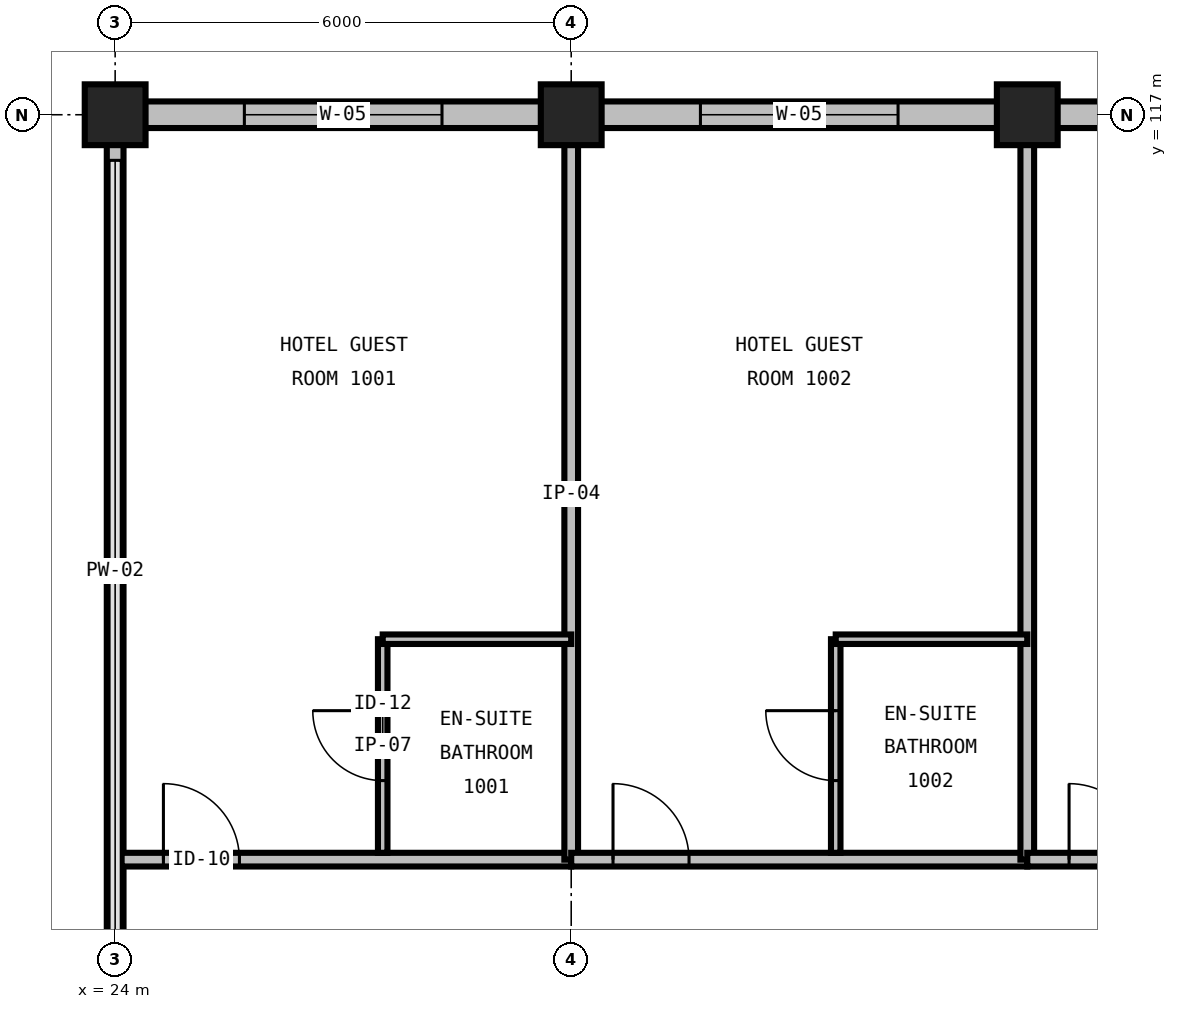
"""IFC4 building model, lengths in metres.
Left out: names, types, materials, properties, quantities, classifications, styles, units other than length and angle.
Written with IfcOpenShell. Run it as: python <this file> out.ifc"""

import sys

from ifc_helpers import new_model, si_unit, direction, frame, frame_2d, origin, origin_2d, place, context, subcontext, project, spatial, rectangle, extrude, element, fill, save


model = new_model("IFC4")
c1 = context("Model", 3, precision=1e-05, world=origin(), true_north=direction((0.0, 1.0)))
c2 = subcontext(c1, "Body", "Model", "MODEL_VIEW")
j1 = project(units=[si_unit("LENGTHUNIT", "METRE"), si_unit("PLANEANGLEUNIT", "RADIAN")], contexts=[c1])
p1 = place(None, origin())
s1 = spatial("IfcSite", under=j1, at=p1, CompositionType="ELEMENT")
p2 = place(p1, origin())
s2 = spatial("IfcBuilding", under=s1, at=p2, CompositionType="ELEMENT")
p3 = place(p2, frame((0.0, 0.0, 45.6)))
s3 = spatial("IfcBuildingStorey", under=s2, at=p3, CompositionType="ELEMENT", Elevation=45.6)
for number, where, z_axis, x_axis in (
    (1, (24.0, 117.0, 0.0), (0.0, 0.0, 1.0), (1.0, 0.0, 0.0)),
    (2, (30.0, 117.0, 0.0), (0.0, 0.0, 1.0), (1.0, 0.0, 0.0)),
    (3, (36.0, 117.0, 0.0), (0.0, 0.0, 1.0), (1.0, 0.0, 0.0)),
):
    element("IfcColumn", number, at=place(p3, frame(where, z_axis=z_axis, x_axis=x_axis)), inside=s3, PredefinedType="COLUMN", context=c2, shape_type="SweptSolid", body=[
        extrude(rectangle(XDim=0.8, YDim=0.8, at=origin_2d()), origin(), (0.0, 0.0, 1.0), 3.6),
    ])
p4 = place(p3, frame((30.0, 117.0, 0.0), z_axis=(0.0, 0.0, 1.0), x_axis=(-1.0, 0.0, 0.0)))
e4 = element("IfcWall", 4, at=p4, inside=s3, PredefinedType="STANDARD", context=c2, shape_type="SweptSolid", body=[
    extrude(rectangle(XDim=6.0, YDim=0.35, at=frame_2d((3.0, 0.0))), origin(), (0.0, 0.0, 1.0), 2.486),
])
p5 = place(p4, frame((1.7, 0.0, 0.72)))
e5 = element("IfcOpeningElement", 5, at=p5, cuts=e4, PredefinedType="OPENING", context=c2, shape_type="SweptSolid", body=[
    extrude(rectangle(XDim=2.6, YDim=1.69, at=frame_2d((1.3, 0.845))), frame((0.0, 0.19, 0.0), z_axis=(0.0, -1.0, 0.0), x_axis=(1.0, 0.0, 0.0)), (0.0, 0.0, 1.0), 0.38),
])
p6 = place(p3, frame((36.0, 117.0, 0.0), z_axis=(0.0, 0.0, 1.0), x_axis=(-1.0, 0.0, 0.0)))
e6 = element("IfcWall", 6, at=p6, inside=s3, PredefinedType="STANDARD", context=c2, shape_type="SweptSolid", body=[
    extrude(rectangle(XDim=6.0, YDim=0.35, at=frame_2d((3.0, 0.0))), origin(), (0.0, 0.0, 1.0), 2.486),
])
p7 = place(p6, frame((1.7, 0.0, 0.72)))
e7 = element("IfcOpeningElement", 7, at=p7, cuts=e6, PredefinedType="OPENING", context=c2, shape_type="SweptSolid", body=[
    extrude(rectangle(XDim=2.6, YDim=1.69, at=frame_2d((1.3, 0.845))), frame((0.0, 0.19, 0.0), z_axis=(0.0, -1.0, 0.0), x_axis=(1.0, 0.0, 0.0)), (0.0, 0.0, 1.0), 0.38),
])
p8 = place(p3, frame((42.0, 117.0, 0.0), z_axis=(0.0, 0.0, 1.0), x_axis=(-1.0, 0.0, 0.0)))
e8 = element("IfcWall", 8, at=p8, inside=s3, PredefinedType="STANDARD", context=c2, shape_type="SweptSolid", body=[
    extrude(rectangle(XDim=6.0, YDim=0.35, at=frame_2d((3.0, 0.0))), origin(), (0.0, 0.0, 1.0), 2.486),
])
p9 = place(p8, frame((1.7, 0.0, 0.72)))
e9 = element("IfcOpeningElement", 9, at=p9, cuts=e8, PredefinedType="OPENING", context=c2, shape_type="SweptSolid", body=[
    extrude(rectangle(XDim=2.6, YDim=1.69, at=frame_2d((1.3, 0.845))), frame((0.0, 0.19, 0.0), z_axis=(0.0, -1.0, 0.0), x_axis=(1.0, 0.0, 0.0)), (0.0, 0.0, 1.0), 0.38),
])
p10 = place(p3, frame((24.0, 117.0, 0.0), z_axis=(0.0, 0.0, 1.0), x_axis=(0.0, -1.0, 0.0)))
e10 = element("IfcWall", 10, at=p10, inside=s3, PredefinedType="PARAPET", context=c2, shape_type="SweptSolid", body=[
    extrude(rectangle(XDim=12.0, YDim=0.22, at=frame_2d((6.0, 0.0))), origin(), (0.0, 0.0, 1.0), 0.2),
])
p11 = place(p3, frame((24.085, 107.2, 0.0), z_axis=(0.0, 0.0, 1.0), x_axis=(1.0, 0.0, 0.0)))
e11 = element("IfcWall", 11, at=p11, inside=s3, PredefinedType="PARTITIONING", context=c2, shape_type="SweptSolid", body=[
    extrude(rectangle(XDim=5.915, YDim=0.18, at=frame_2d((2.957, 0.0))), origin(), (0.0, 0.0, 1.0), 3.29),
])
p12 = place(p11, frame((0.55, 0.0, 0.0)))
e12 = element("IfcOpeningElement", 12, at=p12, cuts=e11, PredefinedType="OPENING", context=c2, shape_type="SweptSolid", body=[
    extrude(rectangle(XDim=1.0, YDim=2.15, at=frame_2d((0.5, 1.075))), frame((0.0, 0.105, 0.0), z_axis=(0.0, -1.0, 0.0), x_axis=(1.0, 0.0, 0.0)), (0.0, 0.0, 1.0), 0.21),
])
p13 = place(p3, frame((30.0, 107.2, 0.0), z_axis=(0.0, 0.0, 1.0), x_axis=(0.0, 1.0, 0.0)))
e13 = element("IfcWall", 13, at=p13, inside=s3, PredefinedType="PARTITIONING", context=c2, shape_type="SweptSolid", body=[
    extrude(rectangle(XDim=9.625, YDim=0.18, at=frame_2d((4.812, 0.0))), origin(), (0.0, 0.0, 1.0), 2.59),
])
p14 = place(p3, frame((27.52, 107.29, 0.0), z_axis=(0.0, 0.0, 1.0), x_axis=(0.0, 1.0, 0.0)))
e14 = element("IfcWall", 14, at=p14, inside=s3, PredefinedType="PARTITIONING", context=c2, shape_type="SweptSolid", body=[
    extrude(rectangle(XDim=2.81, YDim=0.125, at=frame_2d((1.405, 0.0))), origin(), (0.0, 0.0, 1.0), 3.29),
])
p15 = place(p14, frame((0.95, 0.0, 0.0)))
e15 = element("IfcOpeningElement", 15, at=p15, cuts=e14, PredefinedType="OPENING", context=c2, shape_type="SweptSolid", body=[
    extrude(rectangle(XDim=0.92, YDim=2.1, at=frame_2d((0.46, 1.05))), frame((0.0, 0.077, 0.0), z_axis=(0.0, -1.0, 0.0), x_axis=(1.0, 0.0, 0.0)), (0.0, 0.0, 1.0), 0.155),
])
p16 = place(p3, frame((27.52, 110.1, 0.0), z_axis=(0.0, 0.0, 1.0), x_axis=(1.0, 0.0, 0.0)))
e16 = element("IfcWall", 16, at=p16, inside=s3, PredefinedType="PARTITIONING", context=c2, shape_type="SweptSolid", body=[
    extrude(rectangle(XDim=2.48, YDim=0.125, at=frame_2d((1.24, 0.0))), origin(), (0.0, 0.0, 1.0), 3.29),
])
p17 = place(p3, frame((30.0, 107.2, 0.0), z_axis=(0.0, 0.0, 1.0), x_axis=(1.0, 0.0, 0.0)))
e17 = element("IfcWall", 17, at=p17, inside=s3, PredefinedType="PARTITIONING", context=c2, shape_type="SweptSolid", body=[
    extrude(rectangle(XDim=6.0, YDim=0.18, at=frame_2d((3.0, 0.0))), origin(), (0.0, 0.0, 1.0), 3.29),
])
p18 = place(p17, frame((0.55, 0.0, 0.0)))
e18 = element("IfcOpeningElement", 18, at=p18, cuts=e17, PredefinedType="OPENING", context=c2, shape_type="SweptSolid", body=[
    extrude(rectangle(XDim=1.0, YDim=2.15, at=frame_2d((0.5, 1.075))), frame((0.0, 0.105, 0.0), z_axis=(0.0, -1.0, 0.0), x_axis=(1.0, 0.0, 0.0)), (0.0, 0.0, 1.0), 0.21),
])
p19 = place(p3, frame((36.0, 107.2, 0.0), z_axis=(0.0, 0.0, 1.0), x_axis=(0.0, 1.0, 0.0)))
e19 = element("IfcWall", 19, at=p19, inside=s3, PredefinedType="PARTITIONING", context=c2, shape_type="SweptSolid", body=[
    extrude(rectangle(XDim=9.625, YDim=0.18, at=frame_2d((4.812, 0.0))), origin(), (0.0, 0.0, 1.0), 2.59),
])
p20 = place(p3, frame((33.48, 107.29, 0.0), z_axis=(0.0, 0.0, 1.0), x_axis=(0.0, 1.0, 0.0)))
e20 = element("IfcWall", 20, at=p20, inside=s3, PredefinedType="PARTITIONING", context=c2, shape_type="SweptSolid", body=[
    extrude(rectangle(XDim=2.81, YDim=0.125, at=frame_2d((1.405, 0.0))), origin(), (0.0, 0.0, 1.0), 3.29),
])
p21 = place(p20, frame((0.95, 0.0, 0.0)))
e21 = element("IfcOpeningElement", 21, at=p21, cuts=e20, PredefinedType="OPENING", context=c2, shape_type="SweptSolid", body=[
    extrude(rectangle(XDim=0.92, YDim=2.1, at=frame_2d((0.46, 1.05))), frame((0.0, 0.077, 0.0), z_axis=(0.0, -1.0, 0.0), x_axis=(1.0, 0.0, 0.0)), (0.0, 0.0, 1.0), 0.155),
])
p22 = place(p3, frame((33.48, 110.1, 0.0), z_axis=(0.0, 0.0, 1.0), x_axis=(1.0, 0.0, 0.0)))
e22 = element("IfcWall", 22, at=p22, inside=s3, PredefinedType="PARTITIONING", context=c2, shape_type="SweptSolid", body=[
    extrude(rectangle(XDim=2.52, YDim=0.125, at=frame_2d((1.26, 0.0))), origin(), (0.0, 0.0, 1.0), 3.29),
])
p23 = place(p3, frame((36.0, 107.2, 0.0), z_axis=(0.0, 0.0, 1.0), x_axis=(1.0, 0.0, 0.0)))
e23 = element("IfcWall", 23, at=p23, inside=s3, PredefinedType="PARTITIONING", context=c2, shape_type="SweptSolid", body=[
    extrude(rectangle(XDim=6.0, YDim=0.18, at=frame_2d((3.0, 0.0))), origin(), (0.0, 0.0, 1.0), 3.29),
])
p24 = place(p23, frame((0.55, 0.0, 0.0)))
e24 = element("IfcOpeningElement", 24, at=p24, cuts=e23, PredefinedType="OPENING", context=c2, shape_type="SweptSolid", body=[
    extrude(rectangle(XDim=1.0, YDim=2.15, at=frame_2d((0.5, 1.075))), frame((0.0, 0.105, 0.0), z_axis=(0.0, -1.0, 0.0), x_axis=(1.0, 0.0, 0.0)), (0.0, 0.0, 1.0), 0.21),
])
p25 = place(p5, origin())
e25 = element("IfcWindow", 25, at=p25, inside=s3, PartitioningType="DOUBLE_PANEL_VERTICAL", PredefinedType="WINDOW", context=c2, shape_type="SweptSolid", body=[
    extrude(rectangle(XDim=2.6, YDim=1.69, at=frame_2d((1.3, 0.845))), frame((0.0, 0.03, 0.0), z_axis=(0.0, -1.0, 0.0), x_axis=(1.0, 0.0, 0.0)), (0.0, 0.0, 1.0), 0.06),
])
fill(e5, e25)
p26 = place(p7, origin())
e26 = element("IfcWindow", 26, at=p26, inside=s3, PartitioningType="DOUBLE_PANEL_VERTICAL", PredefinedType="WINDOW", context=c2, shape_type="SweptSolid", body=[
    extrude(rectangle(XDim=2.6, YDim=1.69, at=frame_2d((1.3, 0.845))), frame((0.0, 0.03, 0.0), z_axis=(0.0, -1.0, 0.0), x_axis=(1.0, 0.0, 0.0)), (0.0, 0.0, 1.0), 0.06),
])
fill(e7, e26)
p27 = place(p12, origin())
e27 = element("IfcDoor", 27, at=p27, inside=s3, OperationType="SINGLE_SWING_LEFT", PredefinedType="DOOR", context=c2, shape_type="SweptSolid", body=[
    extrude(rectangle(XDim=1.0, YDim=2.15, at=frame_2d((0.5, 1.075))), frame((0.0, 0.025, 0.0), z_axis=(0.0, -1.0, 0.0), x_axis=(1.0, 0.0, 0.0)), (0.0, 0.0, 1.0), 0.05),
])
fill(e12, e27)
p28 = place(p15, origin())
e28 = element("IfcDoor", 28, at=p28, inside=s3, OperationType="SINGLE_SWING_RIGHT", PredefinedType="DOOR", context=c2, shape_type="SweptSolid", body=[
    extrude(rectangle(XDim=0.92, YDim=2.1, at=frame_2d((0.46, 1.05))), frame((0.0, 0.025, 0.0), z_axis=(0.0, -1.0, 0.0), x_axis=(1.0, 0.0, 0.0)), (0.0, 0.0, 1.0), 0.05),
])
fill(e15, e28)
p29 = place(p18, origin())
e29 = element("IfcDoor", 29, at=p29, inside=s3, OperationType="SINGLE_SWING_LEFT", PredefinedType="DOOR", context=c2, shape_type="SweptSolid", body=[
    extrude(rectangle(XDim=1.0, YDim=2.15, at=frame_2d((0.5, 1.075))), frame((0.0, 0.025, 0.0), z_axis=(0.0, -1.0, 0.0), x_axis=(1.0, 0.0, 0.0)), (0.0, 0.0, 1.0), 0.05),
])
fill(e18, e29)
p30 = place(p21, origin())
e30 = element("IfcDoor", 30, at=p30, inside=s3, OperationType="SINGLE_SWING_RIGHT", PredefinedType="DOOR", context=c2, shape_type="SweptSolid", body=[
    extrude(rectangle(XDim=0.92, YDim=2.1, at=frame_2d((0.46, 1.05))), frame((0.0, 0.025, 0.0), z_axis=(0.0, -1.0, 0.0), x_axis=(1.0, 0.0, 0.0)), (0.0, 0.0, 1.0), 0.05),
])
fill(e21, e30)
p31 = place(p24, origin())
e31 = element("IfcDoor", 31, at=p31, inside=s3, OperationType="SINGLE_SWING_LEFT", PredefinedType="DOOR", context=c2, shape_type="SweptSolid", body=[
    extrude(rectangle(XDim=1.0, YDim=2.15, at=frame_2d((0.5, 1.075))), frame((0.0, 0.025, 0.0), z_axis=(0.0, -1.0, 0.0), x_axis=(1.0, 0.0, 0.0)), (0.0, 0.0, 1.0), 0.05),
])
fill(e24, e31)
save(model, sys.argv[1])
